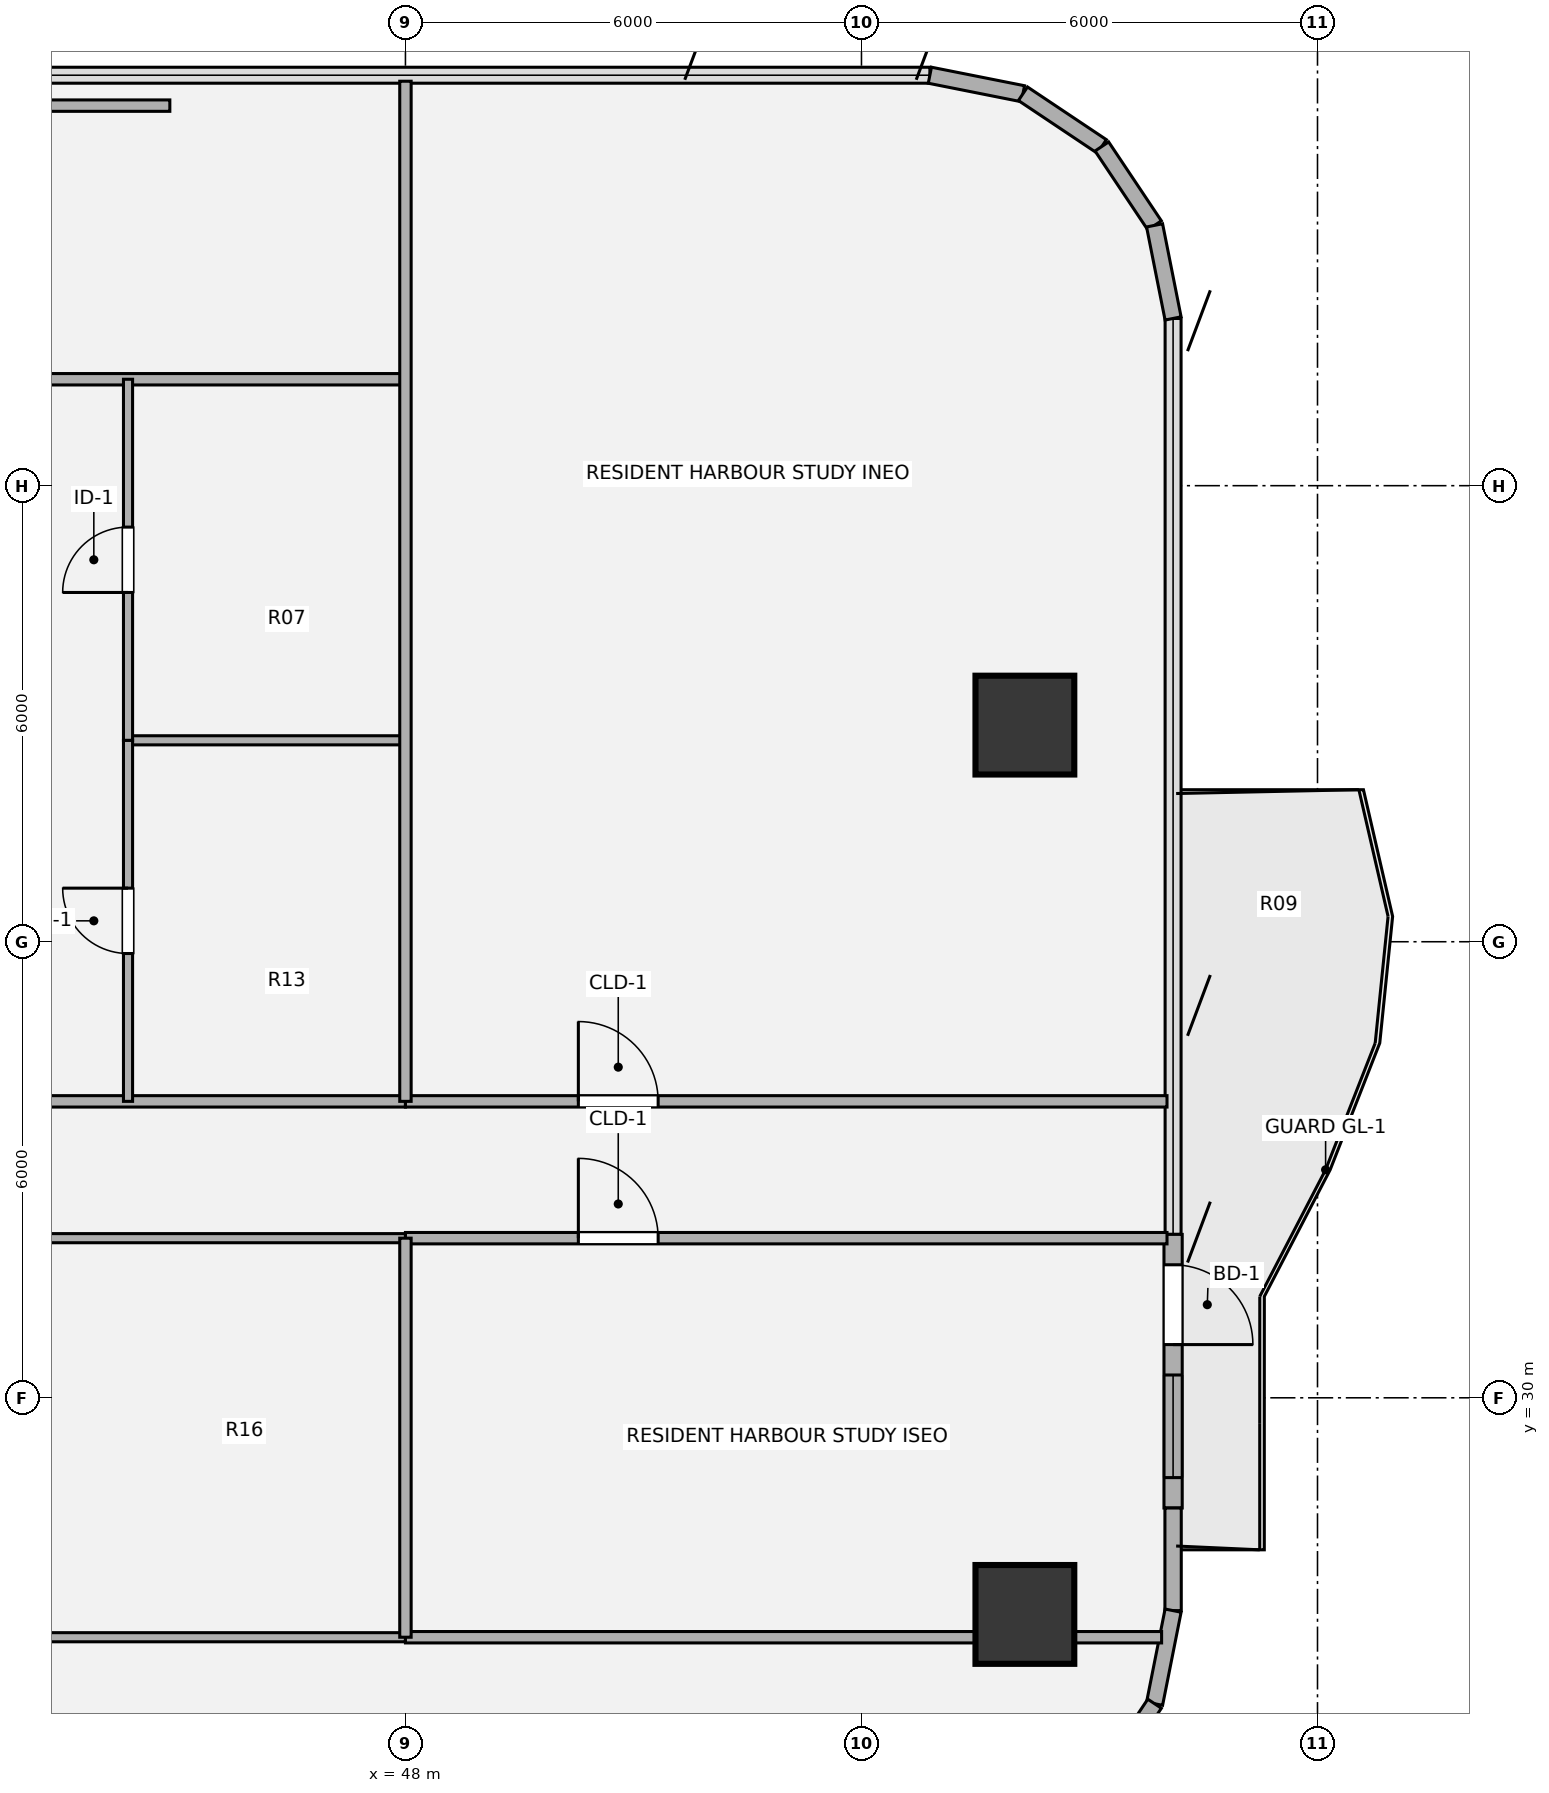
"""IFC4 building model, lengths in metres.
Left out: names, types, materials, properties, quantities, classifications, styles, units other than length and angle.
Written with IfcOpenShell. Run it as: python <this file> out.ifc"""

import sys

from ifc_helpers import new_model, si_unit, direction, frame, frame_2d, origin, origin_2d, place, context, subcontext, project, spatial, rectangle, hollow_circle, extrude, source, transform, mapped, element, fill, save


model = new_model("IFC4")
c1 = context("Model", 3, precision=1e-05, world=origin(), true_north=direction((0.0, 1.0)))
c2 = subcontext(c1, "Body", "Model", "MODEL_VIEW")
j1 = project(units=[si_unit("LENGTHUNIT", "METRE"), si_unit("PLANEANGLEUNIT", "RADIAN")], contexts=[c1])
p1 = place(None, origin())
s1 = spatial("IfcSite", under=j1, at=p1, CompositionType="ELEMENT")
p2 = place(p1, origin())
s2 = spatial("IfcBuilding", under=s1, at=p2, CompositionType="ELEMENT")
p3 = place(p2, frame((0.0, 0.0, 89.82)))
s3 = spatial("IfcBuildingStorey", under=s2, at=p3, CompositionType="ELEMENT", Elevation=89.82)
m1 = source(origin(), c2, "Body", "SweptSolid", [
    extrude(hollow_circle(Radius=0.65, WallThickness=0.045, at=origin_2d()), origin(), (0.0, 0.0, 1.0), 3.78),
])
for number, where, z_axis, x_axis in (
    (1, (56.15, 27.15, 0.0), (0.0, 0.0, 1.0), (1.0, 0.0, 0.0)),
    (2, (56.15, 38.85, 0.0), (0.0, 0.0, 1.0), (1.0, 0.0, 0.0)),
):
    element("IfcColumn", number, at=place(p3, frame(where, z_axis=z_axis, x_axis=x_axis)), inside=s3, PredefinedType="COLUMN", context=c2, shape_type="MappedRepresentation", body=[
        mapped(m1, transform((0.0, 0.0, 0.0), x_axis=(1.0, 0.0, 0.0), y_axis=(0.0, 1.0, 0.0), z_axis=(0.0, 0.0, 1.0), scale=1.0)),
    ])
for number, where, z_axis, x_axis in (
    (3, (54.9, 47.4, 0.0), (0.0, 0.0, 1.0), (0.981, -0.195, 0.0)),
    (4, (56.125, 47.156, 0.0), (0.0, 0.0, 1.0), (0.831, -0.556, 0.0)),
    (5, (57.163, 46.463, 0.0), (0.0, 0.0, 1.0), (0.556, -0.831, 0.0)),
    (6, (57.856, 45.425, 0.0), (0.0, 0.0, 1.0), (0.195, -0.981, 0.0)),
):
    element("IfcWall", number, at=place(p3, frame(where, z_axis=z_axis, x_axis=x_axis)), inside=s3, PredefinedType="SOLIDWALL", context=c2, shape_type="SweptSolid", body=[
        extrude(rectangle(XDim=1.249, YDim=0.215, at=frame_2d((0.624, 0.0))), origin(), (0.0, 0.0, 1.0), 3.53),
    ])
p4 = place(p3, frame((58.1, 32.15, 0.0), z_axis=(0.0, 0.0, 1.0), x_axis=(0.0, -1.0, 0.0)))
e7 = element("IfcWall", 7, at=p4, inside=s3, PredefinedType="SOLIDWALL", context=c2, shape_type="SweptSolid", body=[
    extrude(rectangle(XDim=3.6, YDim=0.24, at=frame_2d((1.8, 0.0))), origin(), (0.0, 0.0, 1.0), 3.53),
])
p5 = place(p4, frame((0.4, 0.0, 0.0)))
e8 = element("IfcOpeningElement", 8, at=p5, cuts=e7, PredefinedType="OPENING", context=c2, shape_type="SweptSolid", body=[
    extrude(rectangle(XDim=1.05, YDim=2.15, at=origin_2d()), frame((0.525, 0.13, 1.075), z_axis=(0.0, -1.0, 0.0), x_axis=(1.0, 0.0, 0.0)), (0.0, 0.0, 1.0), 0.26),
])
p6 = place(p4, frame((1.85, 0.0, 0.85)))
e9 = element("IfcOpeningElement", 9, at=p6, cuts=e7, PredefinedType="OPENING", context=c2, shape_type="SweptSolid", body=[
    extrude(rectangle(XDim=1.35, YDim=1.35, at=origin_2d()), frame((0.675, 0.13, 0.675), z_axis=(0.0, -1.0, 0.0), x_axis=(1.0, 0.0, 0.0)), (0.0, 0.0, 1.0), 0.26),
])
p7 = place(p3, frame((58.1, 28.55, 0.0), z_axis=(0.0, 0.0, 1.0), x_axis=(0.0, -1.0, 0.0)))
e10 = element("IfcWall", 10, at=p7, inside=s3, PredefinedType="SOLIDWALL", context=c2, shape_type="SweptSolid", body=[
    extrude(rectangle(XDim=1.35, YDim=0.215, at=frame_2d((0.675, 0.0))), origin(), (0.0, 0.0, 1.0), 3.53),
])
for number, where, z_axis, x_axis in (
    (11, (58.1, 27.2, 0.0), (0.0, 0.0, 1.0), (-0.195, -0.981, 0.0)),
    (12, (57.856, 25.975, 0.0), (0.0, 0.0, 1.0), (-0.556, -0.831, 0.0)),
):
    element("IfcWall", number, at=place(p3, frame(where, z_axis=z_axis, x_axis=x_axis)), inside=s3, PredefinedType="SOLIDWALL", context=c2, shape_type="SweptSolid", body=[
        extrude(rectangle(XDim=1.249, YDim=0.215, at=frame_2d((0.624, 0.0))), origin(), (0.0, 0.0, 1.0), 3.53),
    ])
p8 = place(p3, frame((43.1, 26.85, 0.0), z_axis=(0.0, 0.0, 1.0), x_axis=(1.0, 0.0, 0.0)))
e13 = element("IfcWall", 13, at=p8, inside=s3, PredefinedType="PARTITIONING", context=c2, shape_type="SweptSolid", body=[
    extrude(rectangle(XDim=4.9, YDim=0.12, at=frame_2d((2.45, 0.0))), origin(), (0.0, 0.0, 1.0), 3.055),
])
p9 = place(p3, frame((48.0, 26.85, 0.0), z_axis=(0.0, 0.0, 1.0), x_axis=(1.0, 0.0, 0.0)))
e14 = element("IfcWall", 14, at=p9, inside=s3, PredefinedType="PARTITIONING", context=c2, shape_type="SweptSolid", body=[
    extrude(rectangle(XDim=9.949, YDim=0.15, at=frame_2d((4.974, 0.0))), origin(), (0.0, 0.0, 1.0), 3.055),
])
p10 = place(p3, frame((43.1, 32.1, 0.0), z_axis=(0.0, 0.0, 1.0), x_axis=(1.0, 0.0, 0.0)))
e15 = element("IfcWall", 15, at=p10, inside=s3, PredefinedType="PARTITIONING", context=c2, shape_type="SweptSolid", body=[
    extrude(rectangle(XDim=4.9, YDim=0.12, at=frame_2d((2.45, 0.0))), origin(), (0.0, 0.0, 1.0), 2.982),
])
p11 = place(p3, frame((48.0, 32.1, 0.0), z_axis=(0.0, 0.0, 1.0), x_axis=(1.0, 0.0, 0.0)))
e16 = element("IfcWall", 16, at=p11, inside=s3, PredefinedType="PARTITIONING", context=c2, shape_type="SweptSolid", body=[
    extrude(rectangle(XDim=10.02, YDim=0.15, at=frame_2d((5.01, 0.0))), origin(), (0.0, 0.0, 1.0), 2.982),
])
p12 = place(p11, frame((2.275, 0.0, 0.0)))
e17 = element("IfcOpeningElement", 17, at=p12, cuts=e16, PredefinedType="OPENING", context=c2, shape_type="SweptSolid", body=[
    extrude(rectangle(XDim=1.05, YDim=2.1, at=origin_2d()), frame((0.525, 0.085, 1.05), z_axis=(0.0, -1.0, 0.0), x_axis=(1.0, 0.0, 0.0)), (0.0, 0.0, 1.0), 0.17),
])
p13 = place(p3, frame((36.9, 33.9, 0.0), z_axis=(0.0, 0.0, 1.0), x_axis=(1.0, 0.0, 0.0)))
e18 = element("IfcWall", 18, at=p13, inside=s3, PredefinedType="PARTITIONING", context=c2, shape_type="SweptSolid", body=[
    extrude(rectangle(XDim=11.1, YDim=0.15, at=frame_2d((5.55, 0.0))), origin(), (0.0, 0.0, 1.0), 2.982),
])
p14 = place(p3, frame((48.0, 33.9, 0.0), z_axis=(0.0, 0.0, 1.0), x_axis=(1.0, 0.0, 0.0)))
e19 = element("IfcWall", 19, at=p14, inside=s3, PredefinedType="PARTITIONING", context=c2, shape_type="SweptSolid", body=[
    extrude(rectangle(XDim=10.02, YDim=0.15, at=frame_2d((5.01, 0.0))), origin(), (0.0, 0.0, 1.0), 2.982),
])
p15 = place(p14, frame((2.275, 0.0, 0.0)))
e20 = element("IfcOpeningElement", 20, at=p15, cuts=e19, PredefinedType="OPENING", context=c2, shape_type="SweptSolid", body=[
    extrude(rectangle(XDim=1.05, YDim=2.1, at=origin_2d()), frame((0.525, 0.085, 1.05), z_axis=(0.0, -1.0, 0.0), x_axis=(1.0, 0.0, 0.0)), (0.0, 0.0, 1.0), 0.17),
])
p16 = place(p3, frame((44.35, 38.65, 0.0), z_axis=(0.0, 0.0, 1.0), x_axis=(1.0, 0.0, 0.0)))
e21 = element("IfcWall", 21, at=p16, inside=s3, PredefinedType="PARTITIONING", context=c2, shape_type="SweptSolid", body=[
    extrude(rectangle(XDim=3.65, YDim=0.12, at=frame_2d((1.825, 0.0))), origin(), (0.0, 0.0, 1.0), 2.903),
])
p17 = place(p3, frame((36.9, 43.4, 0.0), z_axis=(0.0, 0.0, 1.0), x_axis=(1.0, 0.0, 0.0)))
e22 = element("IfcWall", 22, at=p17, inside=s3, PredefinedType="PARTITIONING", context=c2, shape_type="SweptSolid", body=[
    extrude(rectangle(XDim=11.1, YDim=0.15, at=frame_2d((5.55, 0.0))), origin(), (0.0, 0.0, 1.0), 3.308),
])
p18 = place(p3, frame((27.1, 47.0, 0.0), z_axis=(0.0, 0.0, 1.0), x_axis=(1.0, 0.0, 0.0)))
e23 = element("IfcWall", 23, at=p18, inside=s3, PredefinedType="PARTITIONING", context=c2, shape_type="SweptSolid", body=[
    extrude(rectangle(XDim=17.8, YDim=0.15, at=frame_2d((8.9, 0.0))), origin(), (0.0, 0.0, 1.0), 3.308),
])
p19 = place(p18, frame((8.375, 0.0, 0.0)))
e24 = element("IfcOpeningElement", 24, at=p19, cuts=e23, PredefinedType="OPENING", context=c2, shape_type="SweptSolid", body=[
    extrude(rectangle(XDim=1.05, YDim=2.1, at=origin_2d()), frame((0.525, 0.085, 1.05), z_axis=(0.0, -1.0, 0.0), x_axis=(1.0, 0.0, 0.0)), (0.0, 0.0, 1.0), 0.17),
])
p20 = place(p3, frame((44.35, 33.9, 0.0), z_axis=(0.0, 0.0, 1.0), x_axis=(0.0, 1.0, 0.0)))
e25 = element("IfcWall", 25, at=p20, inside=s3, PredefinedType="PARTITIONING", context=c2, shape_type="SweptSolid", body=[
    extrude(rectangle(XDim=4.75, YDim=0.12, at=frame_2d((2.375, 0.0))), origin(), (0.0, 0.0, 1.0), 3.5),
])
p21 = place(p20, frame((1.945, 0.0, 0.0)))
e26 = element("IfcOpeningElement", 26, at=p21, cuts=e25, PredefinedType="OPENING", context=c2, shape_type="SweptSolid", body=[
    extrude(rectangle(XDim=0.86, YDim=2.1, at=origin_2d()), frame((0.43, 0.07, 1.05), z_axis=(0.0, -1.0, 0.0), x_axis=(1.0, 0.0, 0.0)), (0.0, 0.0, 1.0), 0.14),
])
p22 = place(p3, frame((44.35, 38.65, 0.0), z_axis=(0.0, 0.0, 1.0), x_axis=(0.0, 1.0, 0.0)))
e27 = element("IfcWall", 27, at=p22, inside=s3, PredefinedType="PARTITIONING", context=c2, shape_type="SweptSolid", body=[
    extrude(rectangle(XDim=4.75, YDim=0.12, at=frame_2d((2.375, 0.0))), origin(), (0.0, 0.0, 1.0), 3.5),
])
p23 = place(p22, frame((1.945, 0.0, 0.0)))
e28 = element("IfcOpeningElement", 28, at=p23, cuts=e27, PredefinedType="OPENING", context=c2, shape_type="SweptSolid", body=[
    extrude(rectangle(XDim=0.86, YDim=2.1, at=origin_2d()), frame((0.43, 0.07, 1.05), z_axis=(0.0, -1.0, 0.0), x_axis=(1.0, 0.0, 0.0)), (0.0, 0.0, 1.0), 0.14),
])
p24 = place(p3, frame((48.0, 26.85, 0.0), z_axis=(0.0, 0.0, 1.0), x_axis=(0.0, 1.0, 0.0)))
e29 = element("IfcWall", 29, at=p24, inside=s3, PredefinedType="PARTITIONING", context=c2, shape_type="SweptSolid", body=[
    extrude(rectangle(XDim=5.25, YDim=0.15, at=frame_2d((2.625, 0.0))), origin(), (0.0, 0.0, 1.0), 3.5),
])
p25 = place(p3, frame((48.0, 33.9, 0.0), z_axis=(0.0, 0.0, 1.0), x_axis=(0.0, 1.0, 0.0)))
e30 = element("IfcWall", 30, at=p25, inside=s3, PredefinedType="PARTITIONING", context=c2, shape_type="SweptSolid", body=[
    extrude(rectangle(XDim=13.421, YDim=0.15, at=frame_2d((6.71, 0.0))), origin(), (0.0, 0.0, 1.0), 3.5),
])
m2 = source(origin(), c2, "Body", "SweptSolid", [
    extrude(rectangle(XDim=1.05, YDim=2.15, at=origin_2d()), frame((0.525, 0.025, 1.075), z_axis=(0.0, -1.0, 0.0), x_axis=(1.0, 0.0, 0.0)), (0.0, 0.0, 1.0), 0.05),
])
p26 = place(p5, origin())
e31 = element("IfcDoor", 31, at=p26, inside=s3, OperationType="SINGLE_SWING_RIGHT", PredefinedType="DOOR", context=c2, shape_type="MappedRepresentation", body=[
    mapped(m2, transform((0.0, 0.0, 0.0), x_axis=(1.0, 0.0, 0.0), y_axis=(0.0, 1.0, 0.0), z_axis=(0.0, 0.0, 1.0), scale=1.0)),
])
fill(e8, e31)
m3 = source(origin(), c2, "Body", "SweptSolid", [
    extrude(rectangle(XDim=1.35, YDim=1.35, at=origin_2d()), frame((0.675, 0.03, 0.675), z_axis=(0.0, -1.0, 0.0), x_axis=(1.0, 0.0, 0.0)), (0.0, 0.0, 1.0), 0.06),
])
p27 = place(p6, origin())
e32 = element("IfcWindow", 32, at=p27, inside=s3, PartitioningType="SINGLE_PANEL", PredefinedType="WINDOW", context=c2, shape_type="MappedRepresentation", body=[
    mapped(m3, transform((0.0, 0.0, 0.0), x_axis=(1.0, 0.0, 0.0), y_axis=(0.0, 1.0, 0.0), z_axis=(0.0, 0.0, 1.0), scale=1.0)),
])
fill(e9, e32)
m4 = source(origin(), c2, "Body", "SweptSolid", [
    extrude(rectangle(XDim=1.05, YDim=2.1, at=origin_2d()), frame((0.525, 0.025, 1.05), z_axis=(0.0, -1.0, 0.0), x_axis=(1.0, 0.0, 0.0)), (0.0, 0.0, 1.0), 0.05),
])
p28 = place(p12, origin())
e33 = element("IfcDoor", 33, at=p28, inside=s3, OperationType="SINGLE_SWING_LEFT", PredefinedType="DOOR", context=c2, shape_type="MappedRepresentation", body=[
    mapped(m4, transform((0.0, 0.0, 0.0), x_axis=(1.0, 0.0, 0.0), y_axis=(0.0, 1.0, 0.0), z_axis=(0.0, 0.0, 1.0), scale=1.0)),
])
fill(e17, e33)
p29 = place(p15, origin())
e34 = element("IfcDoor", 34, at=p29, inside=s3, OperationType="SINGLE_SWING_LEFT", PredefinedType="DOOR", context=c2, shape_type="MappedRepresentation", body=[
    mapped(m4, transform((0.0, 0.0, 0.0), x_axis=(1.0, 0.0, 0.0), y_axis=(0.0, 1.0, 0.0), z_axis=(0.0, 0.0, 1.0), scale=1.0)),
])
fill(e20, e34)
m5 = source(origin(), c2, "Body", "SweptSolid", [
    extrude(rectangle(XDim=0.86, YDim=2.1, at=origin_2d()), frame((0.43, 0.025, 1.05), z_axis=(0.0, -1.0, 0.0), x_axis=(1.0, 0.0, 0.0)), (0.0, 0.0, 1.0), 0.05),
])
p30 = place(p21, origin())
e35 = element("IfcDoor", 35, at=p30, inside=s3, OperationType="SINGLE_SWING_RIGHT", PredefinedType="DOOR", context=c2, shape_type="MappedRepresentation", body=[
    mapped(m5, transform((0.0, 0.0, 0.0), x_axis=(1.0, 0.0, 0.0), y_axis=(0.0, 1.0, 0.0), z_axis=(0.0, 0.0, 1.0), scale=1.0)),
])
fill(e26, e35)
p31 = place(p23, origin())
e36 = element("IfcDoor", 36, at=p31, inside=s3, OperationType="SINGLE_SWING_LEFT", PredefinedType="DOOR", context=c2, shape_type="MappedRepresentation", body=[
    mapped(m5, transform((0.0, 0.0, 0.0), x_axis=(1.0, 0.0, 0.0), y_axis=(0.0, 1.0, 0.0), z_axis=(0.0, 0.0, 1.0), scale=1.0)),
])
fill(e28, e36)
save(model, sys.argv[1])
